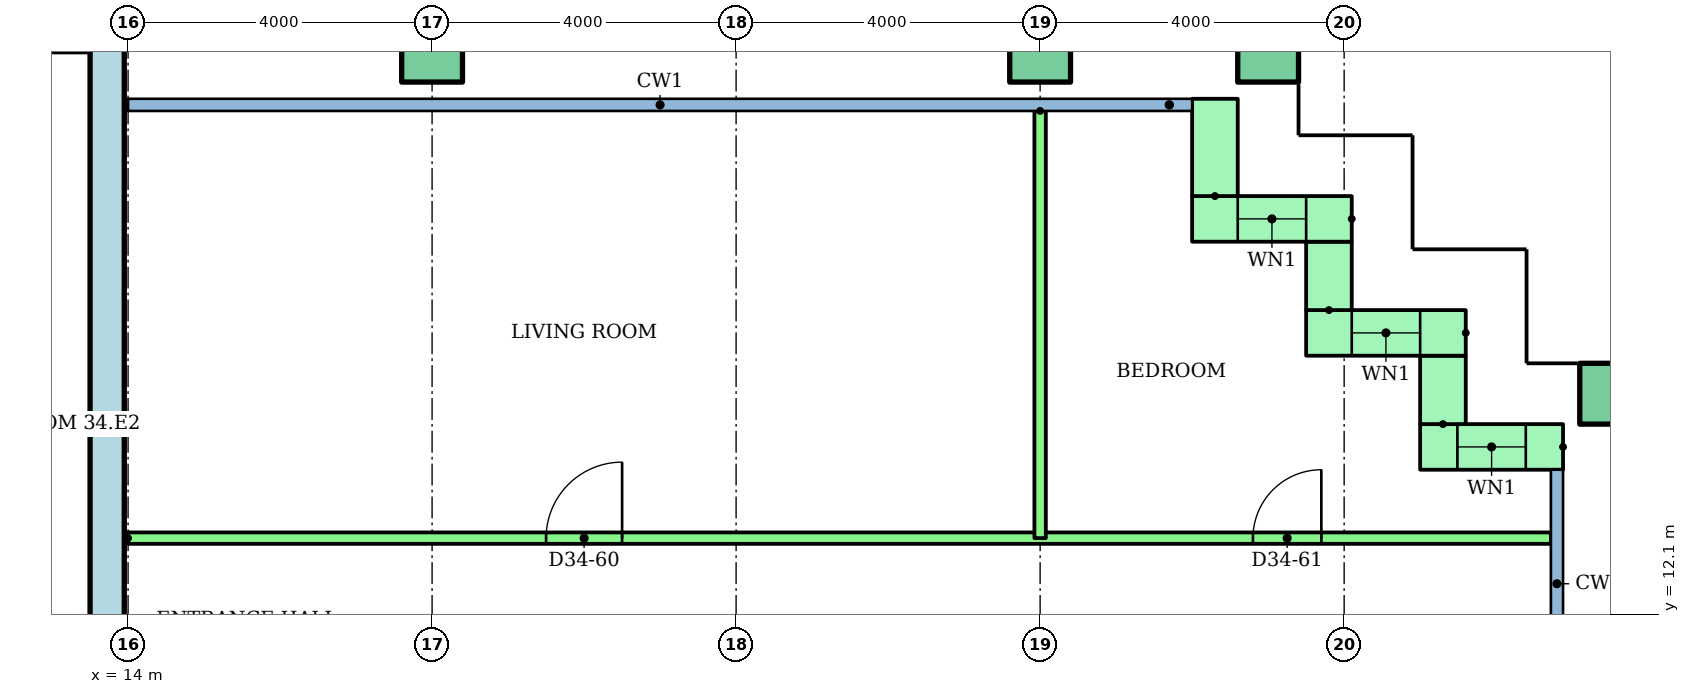
"""IFC4 building model, lengths in metres.
Left out: names, types, materials, properties, quantities, classifications, styles, units other than length and angle.
Written with IfcOpenShell. Run it as: python <this file> out.ifc"""

import sys

from ifc_helpers import new_model, si_unit, direction, frame, frame_2d, origin, origin_2d, place, context, subcontext, project, spatial, rectangle, hollow_rectangle, extrude, element, fill, save


model = new_model("IFC4")
c1 = context("Model", 3, precision=1e-05, world=origin(), true_north=direction((0.0, 1.0)))
c2 = subcontext(c1, "Body", "Model", "MODEL_VIEW")
j1 = project(units=[si_unit("LENGTHUNIT", "METRE"), si_unit("PLANEANGLEUNIT", "RADIAN")], contexts=[c1])
p1 = place(None, origin())
s1 = spatial("IfcSite", under=j1, at=p1, CompositionType="ELEMENT")
p2 = place(p1, origin())
s2 = spatial("IfcBuilding", under=s1, at=p2, CompositionType="ELEMENT")
p3 = place(p2, frame((0.0, 0.0, 132.6)))
s3 = spatial("IfcBuildingStorey", under=s2, at=p3, CompositionType="ELEMENT", Elevation=132.6)
for number, where in (
    (1, (33.5, 15.0, 0.0)),
    (2, (18.0, 19.5, 0.0)),
    (3, (26.0, 19.5, 0.0)),
    (4, (29.0, 19.5, 0.0)),
):
    element("IfcColumn", number, at=place(p3, frame(where)), inside=s3, PredefinedType="COLUMN", context=c2, shape_type="SweptSolid", body=[
        extrude(hollow_rectangle(XDim=0.8, YDim=0.8, WallThickness=0.04, at=origin_2d()), origin(), (0.0, 0.0, 1.0), 3.2),
    ])
p4 = place(p3, frame((32.88, 14.3, 0.0), z_axis=(0.0, 0.0, 1.0), x_axis=(-1.0, 0.0, 0.0)))
e5 = element("IfcWall", 5, at=p4, inside=s3, PredefinedType="STANDARD", context=c2, shape_type="SweptSolid", body=[
    extrude(rectangle(XDim=1.88, YDim=0.6, at=frame_2d((0.94, 0.0))), origin(), (0.0, 0.0, 1.0), 2.92),
])
p5 = place(p4, frame((0.49, 0.0, 0.9)))
e6 = element("IfcOpeningElement", 6, at=p5, cuts=e5, PredefinedType="OPENING", context=c2, shape_type="SweptSolid", body=[
    extrude(rectangle(XDim=0.9, YDim=1.5, at=frame_2d((0.45, 0.75))), frame((0.0, 0.31, 0.0), z_axis=(0.0, -1.0, 0.0), x_axis=(1.0, 0.0, 0.0)), (0.0, 0.0, 1.0), 0.62),
])
p6 = place(p3, frame((31.3, 14.6, 0.0), z_axis=(0.0, 0.0, 1.0), x_axis=(0.0, 1.0, 0.0)))
e7 = element("IfcWall", 7, at=p6, inside=s3, PredefinedType="STANDARD", context=c2, shape_type="SweptSolid", body=[
    extrude(rectangle(XDim=0.9, YDim=0.6, at=frame_2d((0.45, 0.0))), origin(), (0.0, 0.0, 1.0), 2.92),
])
p7 = place(p3, frame((31.6, 15.8, 0.0), z_axis=(0.0, 0.0, 1.0), x_axis=(-1.0, 0.0, 0.0)))
e8 = element("IfcWall", 8, at=p7, inside=s3, PredefinedType="STANDARD", context=c2, shape_type="SweptSolid", body=[
    extrude(rectangle(XDim=2.1, YDim=0.6, at=frame_2d((1.05, 0.0))), origin(), (0.0, 0.0, 1.0), 2.92),
])
p8 = place(p7, frame((0.6, 0.0, 0.9)))
e9 = element("IfcOpeningElement", 9, at=p8, cuts=e8, PredefinedType="OPENING", context=c2, shape_type="SweptSolid", body=[
    extrude(rectangle(XDim=0.9, YDim=1.5, at=frame_2d((0.45, 0.75))), frame((0.0, 0.31, 0.0), z_axis=(0.0, -1.0, 0.0), x_axis=(1.0, 0.0, 0.0)), (0.0, 0.0, 1.0), 0.62),
])
p9 = place(p3, frame((29.8, 16.1, 0.0), z_axis=(0.0, 0.0, 1.0), x_axis=(0.0, 1.0, 0.0)))
e10 = element("IfcWall", 10, at=p9, inside=s3, PredefinedType="STANDARD", context=c2, shape_type="SweptSolid", body=[
    extrude(rectangle(XDim=0.9, YDim=0.6, at=frame_2d((0.45, 0.0))), origin(), (0.0, 0.0, 1.0), 2.92),
])
p10 = place(p3, frame((30.1, 17.3, 0.0), z_axis=(0.0, 0.0, 1.0), x_axis=(-1.0, 0.0, 0.0)))
e11 = element("IfcWall", 11, at=p10, inside=s3, PredefinedType="STANDARD", context=c2, shape_type="SweptSolid", body=[
    extrude(rectangle(XDim=2.1, YDim=0.6, at=frame_2d((1.05, 0.0))), origin(), (0.0, 0.0, 1.0), 2.92),
])
p11 = place(p10, frame((0.6, 0.0, 0.9)))
e12 = element("IfcOpeningElement", 12, at=p11, cuts=e11, PredefinedType="OPENING", context=c2, shape_type="SweptSolid", body=[
    extrude(rectangle(XDim=0.9, YDim=1.5, at=frame_2d((0.45, 0.75))), frame((0.0, 0.31, 0.0), z_axis=(0.0, -1.0, 0.0), x_axis=(1.0, 0.0, 0.0)), (0.0, 0.0, 1.0), 0.62),
])
p12 = place(p3, frame((28.3, 17.6, 0.0), z_axis=(0.0, 0.0, 1.0), x_axis=(0.0, 1.0, 0.0)))
e13 = element("IfcWall", 13, at=p12, inside=s3, PredefinedType="STANDARD", context=c2, shape_type="SweptSolid", body=[
    extrude(rectangle(XDim=1.28, YDim=0.6, at=frame_2d((0.64, 0.0))), origin(), (0.0, 0.0, 1.0), 2.92),
])
p13 = place(p3, frame((13.725, 3.0, 0.0), z_axis=(0.0, 0.0, 1.0), x_axis=(0.0, 1.0, 0.0)))
e14 = element("IfcWall", 14, at=p13, inside=s3, PredefinedType="SHEAR", context=c2, shape_type="SweptSolid", body=[
    extrude(rectangle(XDim=17.0, YDim=0.45, at=frame_2d((8.5, 0.0))), origin(), (0.0, 0.0, 1.0), 2.92),
])
p14 = place(p3, frame((14.0, 13.1, 0.0)))
e15 = element("IfcWall", 15, at=p14, inside=s3, PredefinedType="PARTITIONING", context=c2, shape_type="SweptSolid", body=[
    extrude(rectangle(XDim=18.72, YDim=0.15, at=frame_2d((9.36, 0.0))), origin(), (0.0, 0.0, 1.0), 2.4),
])
p15 = place(p14, frame((5.5, 0.0, 0.0)))
e16 = element("IfcOpeningElement", 16, at=p15, cuts=e15, PredefinedType="OPENING", context=c2, shape_type="SweptSolid", body=[
    extrude(rectangle(XDim=1.0, YDim=2.1, at=frame_2d((0.5, 1.05))), frame((0.0, 0.085, 0.0), z_axis=(0.0, -1.0, 0.0), x_axis=(1.0, 0.0, 0.0)), (0.0, 0.0, 1.0), 0.17),
])
p16 = place(p14, frame((14.8, 0.0, 0.0)))
e17 = element("IfcOpeningElement", 17, at=p16, cuts=e15, PredefinedType="OPENING", context=c2, shape_type="SweptSolid", body=[
    extrude(rectangle(XDim=0.9, YDim=2.1, at=frame_2d((0.45, 1.05))), frame((0.0, 0.085, 0.0), z_axis=(0.0, -1.0, 0.0), x_axis=(1.0, 0.0, 0.0)), (0.0, 0.0, 1.0), 0.17),
])
p17 = place(p3, frame((26.0, 18.721, 0.0), z_axis=(0.0, 0.0, 1.0), x_axis=(0.0, -1.0, 0.0)))
e18 = element("IfcWall", 18, at=p17, inside=s3, PredefinedType="PARTITIONING", context=c2, shape_type="SweptSolid", body=[
    extrude(rectangle(XDim=5.621, YDim=0.15, at=frame_2d((2.811, 0.0))), origin(), (0.0, 0.0, 1.0), 2.4),
])
p18 = place(p5, origin())
e19 = element("IfcWindow", 19, at=p18, inside=s3, PartitioningType="SINGLE_PANEL", PredefinedType="WINDOW", context=c2, shape_type="SweptSolid", body=[
    extrude(rectangle(XDim=0.9, YDim=1.5, at=frame_2d((0.45, 0.75))), frame((0.0, 0.03, 0.0), z_axis=(0.0, -1.0, 0.0), x_axis=(1.0, 0.0, 0.0)), (0.0, 0.0, 1.0), 0.06),
])
fill(e6, e19)
p19 = place(p8, origin())
e20 = element("IfcWindow", 20, at=p19, inside=s3, PartitioningType="SINGLE_PANEL", PredefinedType="WINDOW", context=c2, shape_type="SweptSolid", body=[
    extrude(rectangle(XDim=0.9, YDim=1.5, at=frame_2d((0.45, 0.75))), frame((0.0, 0.03, 0.0), z_axis=(0.0, -1.0, 0.0), x_axis=(1.0, 0.0, 0.0)), (0.0, 0.0, 1.0), 0.06),
])
fill(e9, e20)
p20 = place(p11, origin())
e21 = element("IfcWindow", 21, at=p20, inside=s3, PartitioningType="SINGLE_PANEL", PredefinedType="WINDOW", context=c2, shape_type="SweptSolid", body=[
    extrude(rectangle(XDim=0.9, YDim=1.5, at=frame_2d((0.45, 0.75))), frame((0.0, 0.03, 0.0), z_axis=(0.0, -1.0, 0.0), x_axis=(1.0, 0.0, 0.0)), (0.0, 0.0, 1.0), 0.06),
])
fill(e12, e21)
p21 = place(p15, origin())
e22 = element("IfcDoor", 22, at=p21, inside=s3, OperationType="SINGLE_SWING_RIGHT", PredefinedType="DOOR", context=c2, shape_type="SweptSolid", body=[
    extrude(rectangle(XDim=1.0, YDim=2.1, at=frame_2d((0.5, 1.05))), frame((0.0, 0.025, 0.0), z_axis=(0.0, -1.0, 0.0), x_axis=(1.0, 0.0, 0.0)), (0.0, 0.0, 1.0), 0.05),
])
fill(e16, e22)
p22 = place(p16, origin())
e23 = element("IfcDoor", 23, at=p22, inside=s3, OperationType="SINGLE_SWING_RIGHT", PredefinedType="DOOR", context=c2, shape_type="SweptSolid", body=[
    extrude(rectangle(XDim=0.9, YDim=2.1, at=frame_2d((0.45, 1.05))), frame((0.0, 0.025, 0.0), z_axis=(0.0, -1.0, 0.0), x_axis=(1.0, 0.0, 0.0)), (0.0, 0.0, 1.0), 0.05),
])
fill(e17, e23)
save(model, sys.argv[1])
